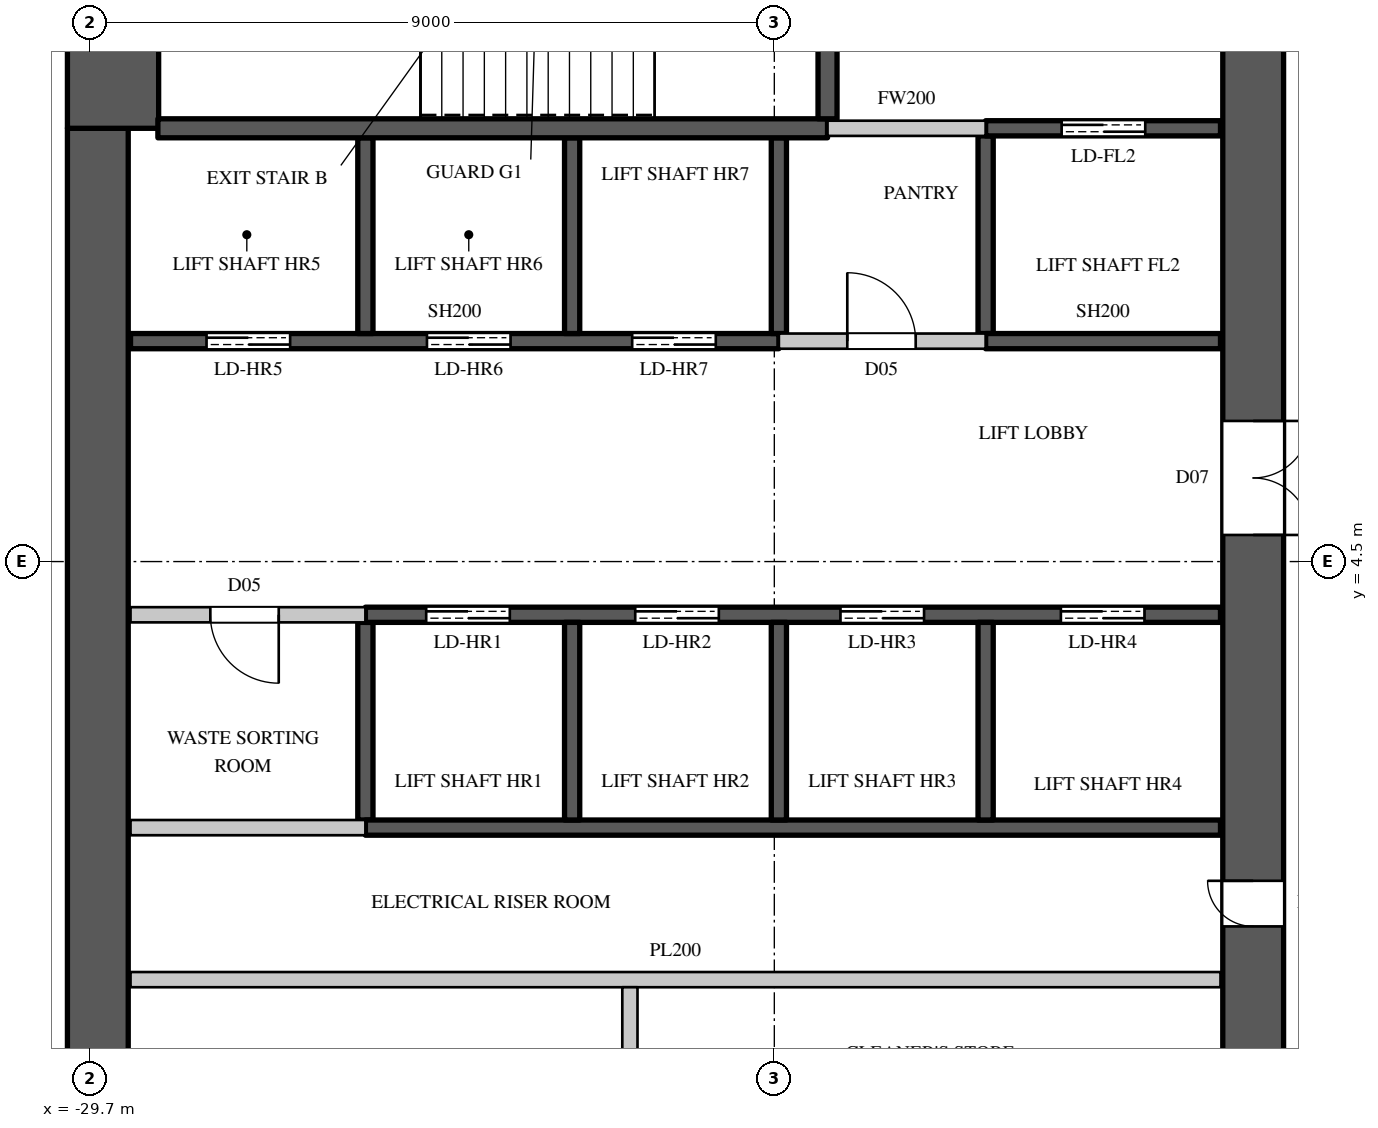
"""IFC4 building model, lengths in metres.
Left out: names, types, materials, properties, quantities, classifications, styles, units other than length and angle.
Written with IfcOpenShell. Run it as: python <this file> out.ifc"""

import sys

from ifc_helpers import new_model, si_unit, direction, frame, frame_2d, origin, place, context, subcontext, project, spatial, rectangle, extrude, element, fill, save


model = new_model("IFC4")
c1 = context("Model", 3, precision=1e-05, world=origin(), true_north=direction((0.0, 1.0)))
c2 = subcontext(c1, "Body", "Model", "MODEL_VIEW")
j1 = project(units=[si_unit("LENGTHUNIT", "METRE"), si_unit("PLANEANGLEUNIT", "RADIAN")], contexts=[c1])
p1 = place(None, origin())
s1 = spatial("IfcSite", under=j1, at=p1, CompositionType="ELEMENT")
p2 = place(p1, origin())
s2 = spatial("IfcBuilding", under=s1, at=p2, CompositionType="ELEMENT")
p3 = place(p2, frame((0.0, 0.0, 164.6)))
s3 = spatial("IfcBuildingStorey", under=s2, at=p3, CompositionType="ELEMENT", Elevation=164.6)
p4 = place(p3, frame((-14.4, -14.8, 0.0), z_axis=(0.0, 0.0, 1.0), x_axis=(0.0, 1.0, 0.0)))
e1 = element("IfcWall", 1, at=p4, inside=s3, PredefinedType="SHEAR", context=c2, shape_type="SweptSolid", body=[
    extrude(rectangle(XDim=29.6, YDim=0.8, at=frame_2d((14.8, 0.0))), origin(), (0.0, 0.0, 1.0), 4.1),
])
p5 = place(p4, frame((1.55, 0.0, 0.0)))
e2 = element("IfcOpeningElement", 2, at=p5, cuts=e1, PredefinedType="OPENING", context=c2, shape_type="SweptSolid", body=[
    extrude(rectangle(XDim=1.5, YDim=2.4, at=frame_2d((0.75, 1.2))), frame((0.0, 0.41, 0.0), z_axis=(0.0, -1.0, 0.0), x_axis=(1.0, 0.0, 0.0)), (0.0, 0.0, 1.0), 0.82),
])
p6 = place(p4, frame((26.55, 0.0, 0.0)))
e3 = element("IfcOpeningElement", 3, at=p6, cuts=e1, PredefinedType="OPENING", context=c2, shape_type="SweptSolid", body=[
    extrude(rectangle(XDim=1.5, YDim=2.4, at=frame_2d((0.75, 1.2))), frame((0.0, 0.41, 0.0), z_axis=(0.0, -1.0, 0.0), x_axis=(1.0, 0.0, 0.0)), (0.0, 0.0, 1.0), 0.82),
])
p7 = place(p4, frame((8.45, 0.0, 0.0)))
e4 = element("IfcOpeningElement", 4, at=p7, cuts=e1, PredefinedType="OPENING", context=c2, shape_type="SweptSolid", body=[
    extrude(rectangle(XDim=1.5, YDim=2.4, at=frame_2d((0.75, 1.2))), frame((0.0, 0.41, 0.0), z_axis=(0.0, -1.0, 0.0), x_axis=(1.0, 0.0, 0.0)), (0.0, 0.0, 1.0), 0.82),
])
p8 = place(p4, frame((19.65, 0.0, 0.0)))
e5 = element("IfcOpeningElement", 5, at=p8, cuts=e1, PredefinedType="OPENING", context=c2, shape_type="SweptSolid", body=[
    extrude(rectangle(XDim=1.5, YDim=2.4, at=frame_2d((0.75, 1.2))), frame((0.0, 0.41, 0.0), z_axis=(0.0, -1.0, 0.0), x_axis=(1.0, 0.0, 0.0)), (0.0, 0.0, 1.0), 0.82),
])
p9 = place(p4, frame((14.5, 0.0, 0.0)))
e6 = element("IfcOpeningElement", 6, at=p9, cuts=e1, PredefinedType="OPENING", context=c2, shape_type="SweptSolid", body=[
    extrude(rectangle(XDim=0.6, YDim=2.0, at=frame_2d((0.3, 1.0))), frame((0.0, 0.41, 0.0), z_axis=(0.0, -1.0, 0.0), x_axis=(1.0, 0.0, 0.0)), (0.0, 0.0, 1.0), 0.82),
])
p10 = place(p3, frame((-29.6, -10.2, 0.0), z_axis=(0.0, 0.0, 1.0), x_axis=(0.0, 1.0, 0.0)))
e7 = element("IfcWall", 7, at=p10, inside=s3, PredefinedType="SHEAR", context=c2, shape_type="SweptSolid", body=[
    extrude(rectangle(XDim=20.4, YDim=0.8, at=frame_2d((10.2, 0.0))), origin(), (0.0, 0.0, 1.0), 4.1),
])
p11 = place(p3, frame((-29.4, 10.2, 0.0), z_axis=(0.0, 0.0, 1.0), x_axis=(0.0, 1.0, 0.0)))
e8 = element("IfcWall", 8, at=p11, inside=s3, PredefinedType="SHEAR", context=c2, shape_type="SweptSolid", body=[
    extrude(rectangle(XDim=4.6, YDim=1.2, at=frame_2d((2.3, 0.0))), origin(), (0.0, 0.0, 1.0), 4.1),
])
p12 = place(p3, frame((-29.17, 3.8, 0.0), z_axis=(0.0, 0.0, 1.0), x_axis=(1.0, 0.0, 0.0)))
e9 = element("IfcWall", 9, at=p12, inside=s3, PredefinedType="PARTITIONING", context=c2, shape_type="SweptSolid", body=[
    extrude(rectangle(XDim=3.09, YDim=0.2, at=frame_2d((1.545, 0.0))), origin(), (0.0, 0.0, 1.0), 3.8),
])
p13 = place(p12, frame((1.05, 0.0, 0.0)))
e10 = element("IfcOpeningElement", 10, at=p13, cuts=e9, PredefinedType="OPENING", context=c2, shape_type="SweptSolid", body=[
    extrude(rectangle(XDim=0.9, YDim=2.2, at=frame_2d((0.45, 1.1))), frame((0.0, 0.11, 0.0), z_axis=(0.0, -1.0, 0.0), x_axis=(1.0, 0.0, 0.0)), (0.0, 0.0, 1.0), 0.22),
])
p14 = place(p3, frame((-20.64, 7.4, 0.0), z_axis=(0.0, 0.0, 1.0), x_axis=(1.0, 0.0, 0.0)))
e11 = element("IfcWall", 11, at=p14, inside=s3, PredefinedType="PARTITIONING", context=c2, shape_type="SweptSolid", body=[
    extrude(rectangle(XDim=2.72, YDim=0.2, at=frame_2d((1.36, 0.0))), origin(), (0.0, 0.0, 1.0), 3.8),
])
p15 = place(p14, frame((0.9, 0.0, 0.0)))
e12 = element("IfcOpeningElement", 12, at=p15, cuts=e11, PredefinedType="OPENING", context=c2, shape_type="SweptSolid", body=[
    extrude(rectangle(XDim=0.9, YDim=2.2, at=frame_2d((0.45, 1.1))), frame((0.0, 0.11, 0.0), z_axis=(0.0, -1.0, 0.0), x_axis=(1.0, 0.0, 0.0)), (0.0, 0.0, 1.0), 0.22),
])
p16 = place(p3, frame((-20.0, 10.2, 0.0), z_axis=(0.0, 0.0, 1.0), x_axis=(1.0, 0.0, 0.0)))
e13 = element("IfcWall", 13, at=p16, inside=s3, PredefinedType="PARTITIONING", context=c2, shape_type="SweptSolid", body=[
    extrude(rectangle(XDim=2.08, YDim=0.2, at=frame_2d((1.04, 0.0))), origin(), (0.0, 0.0, 1.0), 3.8),
])
p17 = place(p3, frame((-29.17, -1.0, 0.0), z_axis=(0.0, 0.0, 1.0), x_axis=(1.0, 0.0, 0.0)))
e14 = element("IfcWall", 14, at=p17, inside=s3, PredefinedType="PARTITIONING", context=c2, shape_type="SweptSolid", body=[
    extrude(rectangle(XDim=14.34, YDim=0.2, at=frame_2d((7.17, 0.0))), origin(), (0.0, 0.0, 1.0), 3.8),
])
p18 = place(p3, frame((-29.17, 1.0, 0.0), z_axis=(0.0, 0.0, 1.0), x_axis=(1.0, 0.0, 0.0)))
e15 = element("IfcWall", 15, at=p18, inside=s3, PredefinedType="PARTITIONING", context=c2, shape_type="SweptSolid", body=[
    extrude(rectangle(XDim=3.09, YDim=0.2, at=frame_2d((1.545, 0.0))), origin(), (0.0, 0.0, 1.0), 3.8),
])
p19 = place(p3, frame((-22.6, -3.7, 0.0), z_axis=(0.0, 0.0, 1.0), x_axis=(0.0, 1.0, 0.0)))
e16 = element("IfcWall", 16, at=p19, inside=s3, PredefinedType="PARTITIONING", context=c2, shape_type="SweptSolid", body=[
    extrude(rectangle(XDim=2.6, YDim=0.2, at=frame_2d((1.3, 0.0))), origin(), (0.0, 0.0, 1.0), 3.8),
])
p20 = place(p3, frame((-29.17, 7.4, 0.0), z_axis=(0.0, 0.0, 1.0), x_axis=(1.0, 0.0, 0.0)))
e17 = element("IfcWall", 17, at=p20, inside=s3, PredefinedType="SHEAR", context=c2, shape_type="SweptSolid", body=[
    extrude(rectangle(XDim=8.53, YDim=0.2, at=frame_2d((4.265, 0.0))), origin(), (0.0, 0.0, 1.0), 3.8),
])
p21 = place(p20, frame((1.0, 0.0, 0.0)))
e18 = element("IfcOpeningElement", 18, at=p21, cuts=e17, PredefinedType="OPENING", context=c2, shape_type="SweptSolid", body=[
    extrude(rectangle(XDim=1.1, YDim=2.2, at=frame_2d((0.55, 1.1))), frame((0.0, 0.11, 0.0), z_axis=(0.0, -1.0, 0.0), x_axis=(1.0, 0.0, 0.0)), (0.0, 0.0, 1.0), 0.22),
])
p22 = place(p20, frame((3.9, 0.0, 0.0)))
e19 = element("IfcOpeningElement", 19, at=p22, cuts=e17, PredefinedType="OPENING", context=c2, shape_type="SweptSolid", body=[
    extrude(rectangle(XDim=1.1, YDim=2.2, at=frame_2d((0.55, 1.1))), frame((0.0, 0.11, 0.0), z_axis=(0.0, -1.0, 0.0), x_axis=(1.0, 0.0, 0.0)), (0.0, 0.0, 1.0), 0.22),
])
p23 = place(p20, frame((6.6, 0.0, 0.0)))
e20 = element("IfcOpeningElement", 20, at=p23, cuts=e17, PredefinedType="OPENING", context=c2, shape_type="SweptSolid", body=[
    extrude(rectangle(XDim=1.1, YDim=2.2, at=frame_2d((0.55, 1.1))), frame((0.0, 0.11, 0.0), z_axis=(0.0, -1.0, 0.0), x_axis=(1.0, 0.0, 0.0)), (0.0, 0.0, 1.0), 0.22),
])
p24 = place(p3, frame((-26.08, 1.1, 0.0), z_axis=(0.0, 0.0, 1.0), x_axis=(0.0, 1.0, 0.0)))
e21 = element("IfcWall", 21, at=p24, inside=s3, PredefinedType="SHEAR", context=c2, shape_type="SweptSolid", body=[
    extrude(rectangle(XDim=2.6, YDim=0.2, at=frame_2d((1.3, 0.0))), origin(), (0.0, 0.0, 1.0), 3.8),
])
p25 = place(p3, frame((-26.08, 1.0, 0.0), z_axis=(0.0, 0.0, 1.0), x_axis=(1.0, 0.0, 0.0)))
e22 = element("IfcWall", 22, at=p25, inside=s3, PredefinedType="SHEAR", context=c2, shape_type="SweptSolid", body=[
    extrude(rectangle(XDim=11.25, YDim=0.2, at=frame_2d((5.625, 0.0))), origin(), (0.0, 0.0, 1.0), 3.8),
])
p26 = place(p3, frame((-26.08, 3.8, 0.0), z_axis=(0.0, 0.0, 1.0), x_axis=(1.0, 0.0, 0.0)))
e23 = element("IfcWall", 23, at=p26, inside=s3, PredefinedType="SHEAR", context=c2, shape_type="SweptSolid", body=[
    extrude(rectangle(XDim=11.25, YDim=0.2, at=frame_2d((5.625, 0.0))), origin(), (0.0, 0.0, 1.0), 3.8),
])
p27 = place(p26, frame((0.8, 0.0, 0.0)))
e24 = element("IfcOpeningElement", 24, at=p27, cuts=e23, PredefinedType="OPENING", context=c2, shape_type="SweptSolid", body=[
    extrude(rectangle(XDim=1.1, YDim=2.2, at=frame_2d((0.55, 1.1))), frame((0.0, 0.11, 0.0), z_axis=(0.0, -1.0, 0.0), x_axis=(1.0, 0.0, 0.0)), (0.0, 0.0, 1.0), 0.22),
])
p28 = place(p26, frame((3.55, 0.0, 0.0)))
e25 = element("IfcOpeningElement", 25, at=p28, cuts=e23, PredefinedType="OPENING", context=c2, shape_type="SweptSolid", body=[
    extrude(rectangle(XDim=1.1, YDim=2.2, at=frame_2d((0.55, 1.1))), frame((0.0, 0.11, 0.0), z_axis=(0.0, -1.0, 0.0), x_axis=(1.0, 0.0, 0.0)), (0.0, 0.0, 1.0), 0.22),
])
p29 = place(p26, frame((6.25, 0.0, 0.0)))
e26 = element("IfcOpeningElement", 26, at=p29, cuts=e23, PredefinedType="OPENING", context=c2, shape_type="SweptSolid", body=[
    extrude(rectangle(XDim=1.1, YDim=2.2, at=frame_2d((0.55, 1.1))), frame((0.0, 0.11, 0.0), z_axis=(0.0, -1.0, 0.0), x_axis=(1.0, 0.0, 0.0)), (0.0, 0.0, 1.0), 0.22),
])
p30 = place(p26, frame((9.15, 0.0, 0.0)))
e27 = element("IfcOpeningElement", 27, at=p30, cuts=e23, PredefinedType="OPENING", context=c2, shape_type="SweptSolid", body=[
    extrude(rectangle(XDim=1.1, YDim=2.2, at=frame_2d((0.55, 1.1))), frame((0.0, 0.11, 0.0), z_axis=(0.0, -1.0, 0.0), x_axis=(1.0, 0.0, 0.0)), (0.0, 0.0, 1.0), 0.22),
])
p31 = place(p3, frame((-26.08, 7.5, 0.0), z_axis=(0.0, 0.0, 1.0), x_axis=(0.0, 1.0, 0.0)))
e28 = element("IfcWall", 28, at=p31, inside=s3, PredefinedType="SHEAR", context=c2, shape_type="SweptSolid", body=[
    extrude(rectangle(XDim=2.575, YDim=0.2, at=frame_2d((1.288, 0.0))), origin(), (0.0, 0.0, 1.0), 4.1),
])
p32 = place(p3, frame((-23.36, 1.1, 0.0), z_axis=(0.0, 0.0, 1.0), x_axis=(0.0, 1.0, 0.0)))
e29 = element("IfcWall", 29, at=p32, inside=s3, PredefinedType="SHEAR", context=c2, shape_type="SweptSolid", body=[
    extrude(rectangle(XDim=2.6, YDim=0.2, at=frame_2d((1.3, 0.0))), origin(), (0.0, 0.0, 1.0), 4.1),
])
p33 = place(p3, frame((-23.36, 7.5, 0.0), z_axis=(0.0, 0.0, 1.0), x_axis=(0.0, 1.0, 0.0)))
e30 = element("IfcWall", 30, at=p33, inside=s3, PredefinedType="SHEAR", context=c2, shape_type="SweptSolid", body=[
    extrude(rectangle(XDim=2.575, YDim=0.2, at=frame_2d((1.288, 0.0))), origin(), (0.0, 0.0, 1.0), 4.1),
])
p34 = place(p3, frame((-20.64, 1.1, 0.0), z_axis=(0.0, 0.0, 1.0), x_axis=(0.0, 1.0, 0.0)))
e31 = element("IfcWall", 31, at=p34, inside=s3, PredefinedType="SHEAR", context=c2, shape_type="SweptSolid", body=[
    extrude(rectangle(XDim=2.6, YDim=0.2, at=frame_2d((1.3, 0.0))), origin(), (0.0, 0.0, 1.0), 4.1),
])
p35 = place(p3, frame((-20.64, 7.5, 0.0), z_axis=(0.0, 0.0, 1.0), x_axis=(0.0, 1.0, 0.0)))
e32 = element("IfcWall", 32, at=p35, inside=s3, PredefinedType="SHEAR", context=c2, shape_type="SweptSolid", body=[
    extrude(rectangle(XDim=2.575, YDim=0.2, at=frame_2d((1.288, 0.0))), origin(), (0.0, 0.0, 1.0), 3.8),
])
p36 = place(p3, frame((-17.92, 1.1, 0.0), z_axis=(0.0, 0.0, 1.0), x_axis=(0.0, 1.0, 0.0)))
e33 = element("IfcWall", 33, at=p36, inside=s3, PredefinedType="SHEAR", context=c2, shape_type="SweptSolid", body=[
    extrude(rectangle(XDim=2.6, YDim=0.2, at=frame_2d((1.3, 0.0))), origin(), (0.0, 0.0, 1.0), 4.1),
])
p37 = place(p3, frame((-17.92, 7.5, 0.0), z_axis=(0.0, 0.0, 1.0), x_axis=(0.0, 1.0, 0.0)))
e34 = element("IfcWall", 34, at=p37, inside=s3, PredefinedType="SHEAR", context=c2, shape_type="SweptSolid", body=[
    extrude(rectangle(XDim=2.6, YDim=0.2, at=frame_2d((1.3, 0.0))), origin(), (0.0, 0.0, 1.0), 3.8),
])
p38 = place(p3, frame((-17.92, 7.4, 0.0), z_axis=(0.0, 0.0, 1.0), x_axis=(1.0, 0.0, 0.0)))
e35 = element("IfcWall", 35, at=p38, inside=s3, PredefinedType="SHEAR", context=c2, shape_type="SweptSolid", body=[
    extrude(rectangle(XDim=3.09, YDim=0.2, at=frame_2d((1.545, 0.0))), origin(), (0.0, 0.0, 1.0), 3.8),
])
p39 = place(p3, frame((-17.92, 10.2, 0.0), z_axis=(0.0, 0.0, 1.0), x_axis=(1.0, 0.0, 0.0)))
e36 = element("IfcWall", 36, at=p39, inside=s3, PredefinedType="SHEAR", context=c2, shape_type="SweptSolid", body=[
    extrude(rectangle(XDim=3.09, YDim=0.2, at=frame_2d((1.545, 0.0))), origin(), (0.0, 0.0, 1.0), 3.8),
])
p40 = place(p39, frame((1.0, 0.0, 0.0)))
e37 = element("IfcOpeningElement", 37, at=p40, cuts=e36, PredefinedType="OPENING", context=c2, shape_type="SweptSolid", body=[
    extrude(rectangle(XDim=1.1, YDim=2.2, at=frame_2d((0.55, 1.1))), frame((0.0, 0.11, 0.0), z_axis=(0.0, -1.0, 0.0), x_axis=(1.0, 0.0, 0.0)), (0.0, 0.0, 1.0), 0.22),
])
p41 = place(p3, frame((-28.81, 10.2, 0.0), z_axis=(0.0, 0.0, 1.0), x_axis=(1.0, 0.0, 0.0)))
e38 = element("IfcWall", 38, at=p41, inside=s3, PredefinedType="SHEAR", context=c2, shape_type="SweptSolid", body=[
    extrude(rectangle(XDim=8.81, YDim=0.25, at=frame_2d((4.405, 0.0))), origin(), (0.0, 0.0, 1.0), 3.8),
])
p42 = place(p3, frame((-20.0, 10.325, 0.0), z_axis=(0.0, 0.0, 1.0), x_axis=(0.0, 1.0, 0.0)))
e39 = element("IfcWall", 39, at=p42, inside=s3, PredefinedType="SHEAR", context=c2, shape_type="SweptSolid", body=[
    extrude(rectangle(XDim=4.445, YDim=0.25, at=frame_2d((2.223, 0.0))), origin(), (0.0, 0.0, 1.0), 3.8),
])
p43 = place(p42, frame((1.65, 0.0, 0.0)))
e40 = element("IfcOpeningElement", 40, at=p43, cuts=e39, PredefinedType="OPENING", context=c2, shape_type="SweptSolid", body=[
    extrude(rectangle(XDim=1.1, YDim=2.2, at=frame_2d((0.55, 1.1))), frame((0.0, 0.135, 0.0), z_axis=(0.0, -1.0, 0.0), x_axis=(1.0, 0.0, 0.0)), (0.0, 0.0, 1.0), 0.27),
])
p44 = place(p13, origin())
e41 = element("IfcDoor", 41, at=p44, inside=s3, OperationType="SINGLE_SWING_LEFT", PredefinedType="DOOR", context=c2, shape_type="SweptSolid", body=[
    extrude(rectangle(XDim=0.9, YDim=2.2, at=frame_2d((0.45, 1.1))), frame((0.0, 0.025, 0.0), z_axis=(0.0, -1.0, 0.0), x_axis=(1.0, 0.0, 0.0)), (0.0, 0.0, 1.0), 0.05),
])
fill(e10, e41)
p45 = place(p15, origin())
e42 = element("IfcDoor", 42, at=p45, inside=s3, OperationType="SINGLE_SWING_LEFT", PredefinedType="DOOR", context=c2, shape_type="SweptSolid", body=[
    extrude(rectangle(XDim=0.9, YDim=2.2, at=frame_2d((0.45, 1.1))), frame((0.0, 0.025, 0.0), z_axis=(0.0, -1.0, 0.0), x_axis=(1.0, 0.0, 0.0)), (0.0, 0.0, 1.0), 0.05),
])
fill(e12, e42)
p46 = place(p27, origin())
e43 = element("IfcDoor", 43, at=p46, inside=s3, OperationType="DOUBLE_DOOR_SLIDING", PredefinedType="DOOR", context=c2, shape_type="SweptSolid", body=[
    extrude(rectangle(XDim=1.1, YDim=2.2, at=frame_2d((0.55, 1.1))), frame((0.0, 0.025, 0.0), z_axis=(0.0, -1.0, 0.0), x_axis=(1.0, 0.0, 0.0)), (0.0, 0.0, 1.0), 0.05),
])
fill(e24, e43)
p47 = place(p28, origin())
e44 = element("IfcDoor", 44, at=p47, inside=s3, OperationType="DOUBLE_DOOR_SLIDING", PredefinedType="DOOR", context=c2, shape_type="SweptSolid", body=[
    extrude(rectangle(XDim=1.1, YDim=2.2, at=frame_2d((0.55, 1.1))), frame((0.0, 0.025, 0.0), z_axis=(0.0, -1.0, 0.0), x_axis=(1.0, 0.0, 0.0)), (0.0, 0.0, 1.0), 0.05),
])
fill(e25, e44)
p48 = place(p29, origin())
e45 = element("IfcDoor", 45, at=p48, inside=s3, OperationType="DOUBLE_DOOR_SLIDING", PredefinedType="DOOR", context=c2, shape_type="SweptSolid", body=[
    extrude(rectangle(XDim=1.1, YDim=2.2, at=frame_2d((0.55, 1.1))), frame((0.0, 0.025, 0.0), z_axis=(0.0, -1.0, 0.0), x_axis=(1.0, 0.0, 0.0)), (0.0, 0.0, 1.0), 0.05),
])
fill(e26, e45)
p49 = place(p30, origin())
e46 = element("IfcDoor", 46, at=p49, inside=s3, OperationType="DOUBLE_DOOR_SLIDING", PredefinedType="DOOR", context=c2, shape_type="SweptSolid", body=[
    extrude(rectangle(XDim=1.1, YDim=2.2, at=frame_2d((0.55, 1.1))), frame((0.0, 0.025, 0.0), z_axis=(0.0, -1.0, 0.0), x_axis=(1.0, 0.0, 0.0)), (0.0, 0.0, 1.0), 0.05),
])
fill(e27, e46)
p50 = place(p21, origin())
e47 = element("IfcDoor", 47, at=p50, inside=s3, OperationType="DOUBLE_DOOR_SLIDING", PredefinedType="DOOR", context=c2, shape_type="SweptSolid", body=[
    extrude(rectangle(XDim=1.1, YDim=2.2, at=frame_2d((0.55, 1.1))), frame((0.0, 0.025, 0.0), z_axis=(0.0, -1.0, 0.0), x_axis=(1.0, 0.0, 0.0)), (0.0, 0.0, 1.0), 0.05),
])
fill(e18, e47)
p51 = place(p22, origin())
e48 = element("IfcDoor", 48, at=p51, inside=s3, OperationType="DOUBLE_DOOR_SLIDING", PredefinedType="DOOR", context=c2, shape_type="SweptSolid", body=[
    extrude(rectangle(XDim=1.1, YDim=2.2, at=frame_2d((0.55, 1.1))), frame((0.0, 0.025, 0.0), z_axis=(0.0, -1.0, 0.0), x_axis=(1.0, 0.0, 0.0)), (0.0, 0.0, 1.0), 0.05),
])
fill(e19, e48)
p52 = place(p23, origin())
e49 = element("IfcDoor", 49, at=p52, inside=s3, OperationType="DOUBLE_DOOR_SLIDING", PredefinedType="DOOR", context=c2, shape_type="SweptSolid", body=[
    extrude(rectangle(XDim=1.1, YDim=2.2, at=frame_2d((0.55, 1.1))), frame((0.0, 0.025, 0.0), z_axis=(0.0, -1.0, 0.0), x_axis=(1.0, 0.0, 0.0)), (0.0, 0.0, 1.0), 0.05),
])
fill(e20, e49)
p53 = place(p40, origin())
e50 = element("IfcDoor", 50, at=p53, inside=s3, OperationType="DOUBLE_DOOR_SLIDING", PredefinedType="DOOR", context=c2, shape_type="SweptSolid", body=[
    extrude(rectangle(XDim=1.1, YDim=2.2, at=frame_2d((0.55, 1.1))), frame((0.0, 0.025, 0.0), z_axis=(0.0, -1.0, 0.0), x_axis=(1.0, 0.0, 0.0)), (0.0, 0.0, 1.0), 0.05),
])
fill(e37, e50)
p54 = place(p8, origin())
e51 = element("IfcDoor", 51, at=p54, inside=s3, OperationType="DOUBLE_DOOR_SINGLE_SWING", PredefinedType="DOOR", context=c2, shape_type="SweptSolid", body=[
    extrude(rectangle(XDim=1.5, YDim=2.4, at=frame_2d((0.75, 1.2))), frame((0.0, -0.345, 0.0), z_axis=(0.0, -1.0, 0.0), x_axis=(1.0, 0.0, 0.0)), (0.0, 0.0, 1.0), 0.05),
])
fill(e5, e51)
p55 = place(p9, origin())
e52 = element("IfcDoor", 52, at=p55, inside=s3, OperationType="SINGLE_SWING_RIGHT", PredefinedType="DOOR", context=c2, shape_type="SweptSolid", body=[
    extrude(rectangle(XDim=0.6, YDim=2.0, at=frame_2d((0.3, 1.0))), frame((0.0, 0.395, 0.0), z_axis=(0.0, -1.0, 0.0), x_axis=(1.0, 0.0, 0.0)), (0.0, 0.0, 1.0), 0.05),
])
fill(e6, e52)
save(model, sys.argv[1])
